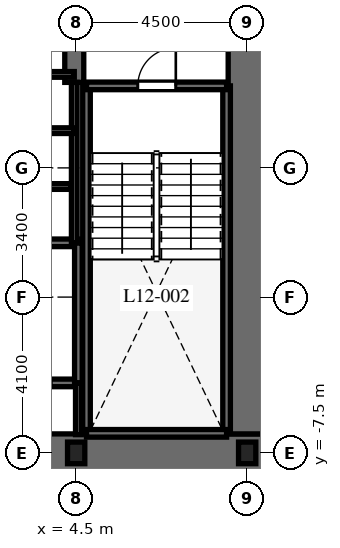
"""IFC4 building model, lengths in metres.
Left out: names, types, materials, properties, quantities, classifications, styles, units other than length and angle.
Written with IfcOpenShell. Run it as: python <this file> out.ifc"""

import sys

from ifc_helpers import new_model, si_unit, direction, frame, frame_2d, origin, origin_2d, place, context, subcontext, project, spatial, rectangle, i_section, extrude, element, fill, save


model = new_model("IFC4")
c1 = context("Model", 3, precision=1e-05, world=origin(), true_north=direction((0.0, 1.0)))
c2 = subcontext(c1, "Body", "Model", "MODEL_VIEW")
j1 = project(units=[si_unit("LENGTHUNIT", "METRE"), si_unit("PLANEANGLEUNIT", "RADIAN")], contexts=[c1])
p1 = place(None, origin())
s1 = spatial("IfcSite", under=j1, at=p1, CompositionType="ELEMENT")
p2 = place(p1, origin())
s2 = spatial("IfcBuilding", under=s1, at=p2, CompositionType="ELEMENT")
p3 = place(p2, frame((0.0, 0.0, 56.4)))
s3 = spatial("IfcBuildingStorey", under=s2, at=p3, CompositionType="ELEMENT", Elevation=56.4)
p4 = place(p3, frame((-9.5, -7.5, 0.0), z_axis=(0.0, 0.0, 1.0), x_axis=(1.0, 0.0, 0.0)))
e1 = element("IfcWall", 1, at=p4, inside=s3, PredefinedType="SHEAR", context=c2, shape_type="SweptSolid", body=[
    extrude(rectangle(XDim=19.0, YDim=1.0, at=frame_2d((9.5, 0.0))), origin(), (0.0, 0.0, 1.0), 3.7),
])
p5 = place(p4, frame((9.55, 0.0, 0.0)))
e2 = element("IfcOpeningElement", 2, at=p5, cuts=e1, PredefinedType="OPENING", context=c2, shape_type="SweptSolid", body=[
    extrude(rectangle(XDim=1.0, YDim=2.15, at=frame_2d((0.5, 1.075))), frame((0.0, 0.51, 0.0), z_axis=(0.0, -1.0, 0.0), x_axis=(1.0, 0.0, 0.0)), (0.0, 0.0, 1.0), 1.02),
])
p6 = place(p3, frame((9.0, -7.0, 0.0), z_axis=(0.0, 0.0, 1.0), x_axis=(0.0, 1.0, 0.0)))
e3 = element("IfcWall", 3, at=p6, inside=s3, PredefinedType="SHEAR", context=c2, shape_type="SweptSolid", body=[
    extrude(rectangle(XDim=14.0, YDim=1.0, at=frame_2d((7.0, 0.0))), origin(), (0.0, 0.0, 1.0), 3.7),
])
p7 = place(p6, frame((10.125, 0.0, 0.0)))
e4 = element("IfcOpeningElement", 4, at=p7, cuts=e3, PredefinedType="OPENING", context=c2, shape_type="SweptSolid", body=[
    extrude(rectangle(XDim=1.05, YDim=2.15, at=frame_2d((0.525, 1.075))), frame((0.0, 0.51, 0.0), z_axis=(0.0, -1.0, 0.0), x_axis=(1.0, 0.0, 0.0)), (0.0, 0.0, 1.0), 1.02),
])
p8 = place(p3, frame((4.45, 2.25, 0.0), z_axis=(0.0, 0.0, 1.0), x_axis=(0.0, 1.0, 0.0)))
e5 = element("IfcWall", 5, at=p8, inside=s3, PredefinedType="SHEAR", context=c2, shape_type="SweptSolid", body=[
    extrude(rectangle(XDim=4.75, YDim=0.5, at=frame_2d((2.375, 0.0))), origin(), (0.0, 0.0, 1.0), 3.7),
])
for number, where, z_axis, x_axis in (
    (6, (4.772, -6.985, 0.0), (0.0, 0.0, 1.0), (0.0, 1.0, 0.0)),
    (7, (8.458, -6.985, 0.0), (0.0, 0.0, 1.0), (0.0, 1.0, 0.0)),
):
    element("IfcWall", number, at=place(p3, frame(where, z_axis=z_axis, x_axis=x_axis)), inside=s3, PredefinedType="SHEAR", context=c2, shape_type="SweptSolid", body=[
        extrude(rectangle(XDim=9.143, YDim=0.2, at=frame_2d((4.572, 0.0))), origin(), (0.0, 0.0, 1.0), 3.7),
    ])
p9 = place(p3, frame((4.772, -6.985, 0.0), z_axis=(0.0, 0.0, 1.0), x_axis=(1.0, 0.0, 0.0)))
e8 = element("IfcWall", 8, at=p9, inside=s3, PredefinedType="SHEAR", context=c2, shape_type="SweptSolid", body=[
    extrude(rectangle(XDim=3.686, YDim=0.2, at=frame_2d((1.843, 0.0))), origin(), (0.0, 0.0, 1.0), 3.7),
])
p10 = place(p3, frame((4.772, 2.158, 0.0), z_axis=(0.0, 0.0, 1.0), x_axis=(1.0, 0.0, 0.0)))
e9 = element("IfcWall", 9, at=p10, inside=s3, PredefinedType="SHEAR", context=c2, shape_type="SweptSolid", body=[
    extrude(rectangle(XDim=3.686, YDim=0.2, at=frame_2d((1.843, 0.0))), origin(), (0.0, 0.0, 1.0), 3.7),
])
p11 = place(p10, frame((1.35, 0.0, 0.0)))
e10 = element("IfcOpeningElement", 10, at=p11, cuts=e9, PredefinedType="OPENING", context=c2, shape_type="SweptSolid", body=[
    extrude(rectangle(XDim=1.0, YDim=2.15, at=frame_2d((0.5, 1.075))), frame((0.0, 0.11, 0.0), z_axis=(0.0, -1.0, 0.0), x_axis=(1.0, 0.0, 0.0)), (0.0, 0.0, 1.0), 0.22),
])
p12 = place(p3, frame((-4.608, -5.658, 0.0), z_axis=(0.0, 0.0, 1.0), x_axis=(1.0, 0.0, 0.0)))
e11 = element("IfcWall", 11, at=p12, inside=s3, PredefinedType="SHEAR", context=c2, shape_type="SweptSolid", body=[
    extrude(rectangle(XDim=9.166, YDim=0.2, at=frame_2d((4.583, 0.0))), origin(), (0.0, 0.0, 1.0), 3.7),
])
p13 = place(p12, frame((7.45, 0.0, 0.0)))
e12 = element("IfcOpeningElement", 12, at=p13, cuts=e11, PredefinedType="OPENING", context=c2, shape_type="SweptSolid", body=[
    extrude(rectangle(XDim=1.0, YDim=2.15, at=frame_2d((0.5, 1.075))), frame((0.0, 0.11, 0.0), z_axis=(0.0, -1.0, 0.0), x_axis=(1.0, 0.0, 0.0)), (0.0, 0.0, 1.0), 0.22),
])
p14 = place(p3, frame((-4.608, -1.972, 0.0), z_axis=(0.0, 0.0, 1.0), x_axis=(1.0, 0.0, 0.0)))
e13 = element("IfcWall", 13, at=p14, inside=s3, PredefinedType="SHEAR", context=c2, shape_type="SweptSolid", body=[
    extrude(rectangle(XDim=9.166, YDim=0.2, at=frame_2d((4.583, 0.0))), origin(), (0.0, 0.0, 1.0), 3.7),
])
p15 = place(p3, frame((4.558, -5.658, 0.0), z_axis=(0.0, 0.0, 1.0), x_axis=(0.0, 1.0, 0.0)))
e14 = element("IfcWall", 14, at=p15, inside=s3, PredefinedType="SHEAR", context=c2, shape_type="SweptSolid", body=[
    extrude(rectangle(XDim=3.686, YDim=0.2, at=frame_2d((1.843, 0.0))), origin(), (0.0, 0.0, 1.0), 3.7),
])
for number, where, z_axis, x_axis in (
    (15, (4.5, -7.5, 0.0), (0.0, 0.0, 1.0), (1.0, 0.0, 0.0)),
    (16, (9.0, -7.5, 0.0), (0.0, 0.0, 1.0), (1.0, 0.0, 0.0)),
):
    element("IfcColumn", number, at=place(p3, frame(where, z_axis=z_axis, x_axis=x_axis)), inside=s3, PredefinedType="COLUMN", context=c2, shape_type="SweptSolid", body=[
        extrude(i_section(OverallWidth=0.454, OverallDepth=0.569, WebThickness=0.078, FlangeThickness=0.125, at=origin_2d()), origin(), (0.0, 0.0, 1.0), 3.7),
    ])
p16 = place(p3, frame((4.558, -7.02, 0.0), z_axis=(0.0, 0.0, 1.0), x_axis=(0.0, 1.0, 0.0)))
e17 = element("IfcWall", 17, at=p16, inside=s3, PredefinedType="PARTITIONING", context=c2, shape_type="SweptSolid", body=[
    extrude(rectangle(XDim=1.362, YDim=0.15, at=frame_2d((0.681, 0.0))), origin(), (0.0, 0.0, 1.0), 3.4),
])
p17 = place(p3, frame((4.45, -1.972, 0.0), z_axis=(0.0, 0.0, 1.0), x_axis=(0.0, 1.0, 0.0)))
e18 = element("IfcWall", 18, at=p17, inside=s3, PredefinedType="PARTITIONING", context=c2, shape_type="SweptSolid", body=[
    extrude(rectangle(XDim=4.222, YDim=0.15, at=frame_2d((2.111, 0.0))), origin(), (0.0, 0.0, 1.0), 3.4),
])
for number, where, z_axis, x_axis in (
    (19, (1.9, 0.98, 0.0), (0.0, 0.0, 1.0), (1.0, 0.0, 0.0)),
    (20, (1.9, 2.46, 0.0), (0.0, 0.0, 1.0), (1.0, 0.0, 0.0)),
):
    element("IfcWall", number, at=place(p3, frame(where, z_axis=z_axis, x_axis=x_axis)), inside=s3, PredefinedType="PARTITIONING", context=c2, shape_type="SweptSolid", body=[
        extrude(rectangle(XDim=2.55, YDim=0.15, at=frame_2d((1.275, 0.0))), origin(), (0.0, 0.0, 1.0), 3.4),
    ])
p18 = place(p3, frame((-4.36, -0.49, 0.0), z_axis=(0.0, 0.0, 1.0), x_axis=(1.0, 0.0, 0.0)))
e21 = element("IfcWall", 21, at=p18, inside=s3, PredefinedType="PARTITIONING", context=c2, shape_type="SweptSolid", body=[
    extrude(rectangle(XDim=8.72, YDim=0.15, at=frame_2d((4.36, 0.0))), origin(), (0.0, 0.0, 1.0), 3.4),
])
p19 = place(p18, frame((2.81, 0.0, 0.0)))
e22 = element("IfcOpeningElement", 22, at=p19, cuts=e21, PredefinedType="OPENING", context=c2, shape_type="SweptSolid", body=[
    extrude(rectangle(XDim=0.85, YDim=2.03, at=frame_2d((0.425, 1.015))), frame((0.0, 0.085, 0.0), z_axis=(0.0, -1.0, 0.0), x_axis=(1.0, 0.0, 0.0)), (0.0, 0.0, 1.0), 0.17),
])
p20 = place(p18, frame((4.61, 0.0, 0.0)))
e23 = element("IfcOpeningElement", 23, at=p20, cuts=e21, PredefinedType="OPENING", context=c2, shape_type="SweptSolid", body=[
    extrude(rectangle(XDim=0.85, YDim=2.03, at=frame_2d((0.425, 1.015))), frame((0.0, 0.085, 0.0), z_axis=(0.0, -1.0, 0.0), x_axis=(1.0, 0.0, 0.0)), (0.0, 0.0, 1.0), 0.17),
])
p21 = place(p11, origin())
e24 = element("IfcDoor", 24, at=p21, inside=s3, OperationType="SINGLE_SWING_RIGHT", PredefinedType="DOOR", context=c2, shape_type="SweptSolid", body=[
    extrude(rectangle(XDim=1.0, YDim=2.15, at=frame_2d((0.5, 1.075))), frame((0.0, 0.025, 0.0), z_axis=(0.0, -1.0, 0.0), x_axis=(1.0, 0.0, 0.0)), (0.0, 0.0, 1.0), 0.05),
])
fill(e10, e24)
save(model, sys.argv[1])
